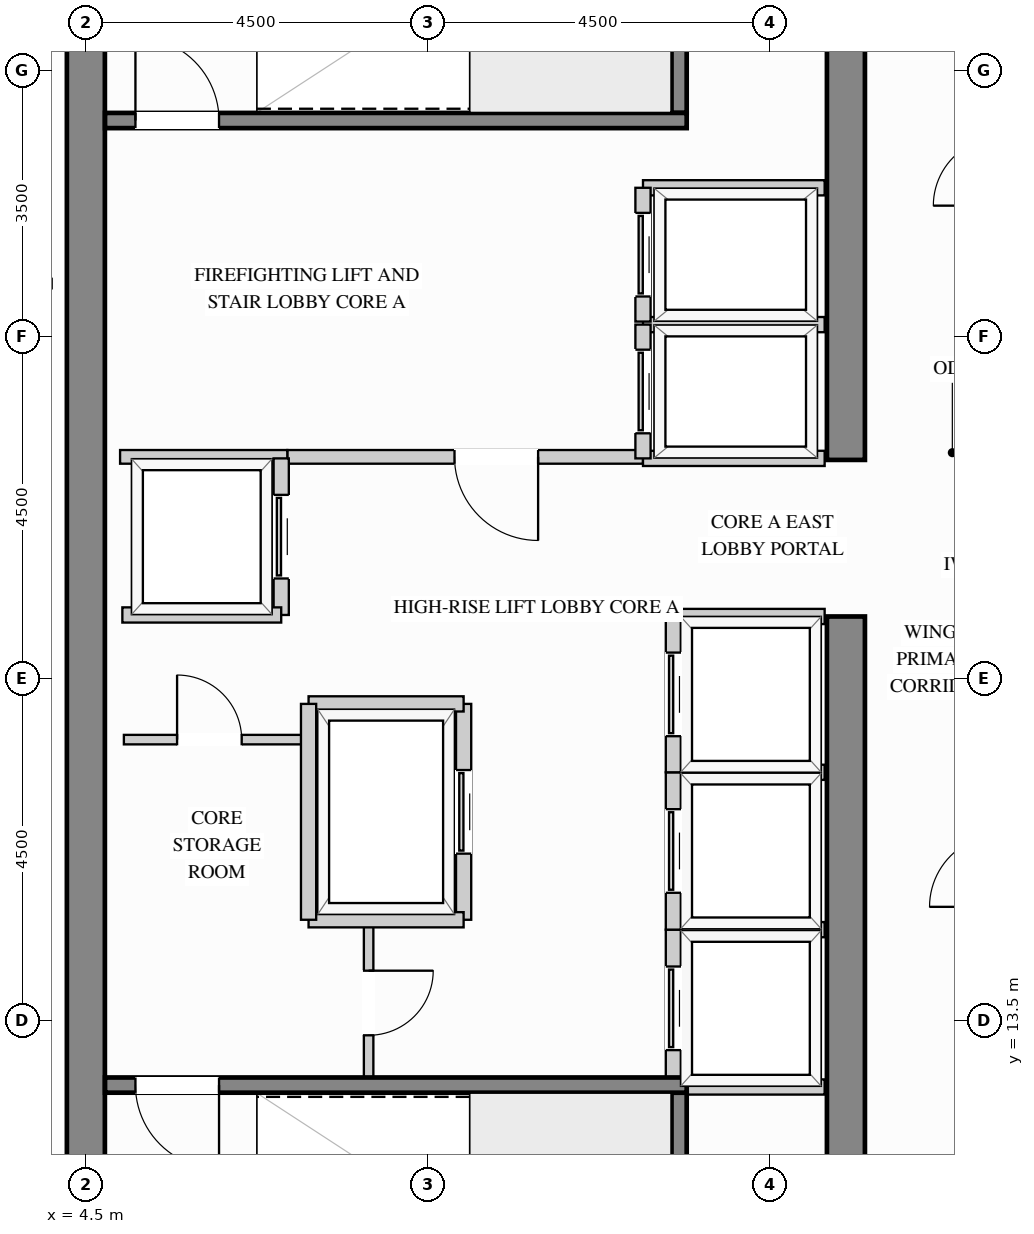
"""IFC4 building model, lengths in metres.
Left out: names, types, materials, properties, quantities, classifications, styles, units other than length and angle.
Written with IfcOpenShell. Run it as: python <this file> out.ifc"""

import sys

from ifc_helpers import new_model, si_unit, direction, frame, frame_2d, origin, place, context, subcontext, project, spatial, rectangle, extrude, source, transform, mapped, element, fill, save


model = new_model("IFC4")
c1 = context("Model", 3, precision=1e-05, world=origin(), true_north=direction((0.0, 1.0)))
c2 = subcontext(c1, "Body", "Model", "MODEL_VIEW")
j1 = project(units=[si_unit("LENGTHUNIT", "METRE"), si_unit("PLANEANGLEUNIT", "RADIAN")], contexts=[c1])
p1 = place(None, origin())
s1 = spatial("IfcSite", under=j1, at=p1, CompositionType="ELEMENT")
p2 = place(p1, origin())
s2 = spatial("IfcBuilding", under=s1, at=p2, CompositionType="ELEMENT")
p3 = place(p2, frame((0.0, 0.0, 248.4)))
s3 = spatial("IfcBuildingStorey", under=s2, at=p3, CompositionType="ELEMENT", Elevation=248.4)
m1 = source(origin(), c2, "Body", "SweptSolid", [
    extrude(rectangle(XDim=10.07, YDim=0.5, at=frame_2d((5.035, 0.0))), origin(), (0.0, 0.0, 1.0), 3.4),
])
p4 = place(p3, frame((14.5, 8.75, 0.0), z_axis=(0.0, 0.0, 1.0), x_axis=(0.0, 1.0, 0.0)))
e1 = element("IfcWall", 1, at=p4, inside=s3, PredefinedType="SHEAR", context=c2, shape_type="MappedRepresentation", body=[
    mapped(m1, transform((0.0, 0.0, 0.0), x_axis=(1.0, 0.0, 0.0), y_axis=(0.0, 1.0, 0.0), z_axis=(0.0, 0.0, 1.0))),
])
m2 = source(origin(), c2, "Body", "SweptSolid", [
    extrude(rectangle(XDim=8.37, YDim=0.5, at=frame_2d((4.185, 0.0))), origin(), (0.0, 0.0, 1.0), 3.4),
])
p5 = place(p3, frame((14.5, 20.88, 0.0), z_axis=(0.0, 0.0, 1.0), x_axis=(0.0, 1.0, 0.0)))
e2 = element("IfcWall", 2, at=p5, inside=s3, PredefinedType="SHEAR", context=c2, shape_type="MappedRepresentation", body=[
    mapped(m2, transform((0.0, 0.0, 0.0), x_axis=(1.0, 0.0, 0.0), y_axis=(0.0, 1.0, 0.0), z_axis=(0.0, 0.0, 1.0))),
])
m3 = source(origin(), c2, "Body", "SweptSolid", [
    extrude(rectangle(XDim=20.5, YDim=0.5, at=frame_2d((10.25, 0.0))), origin(), (0.0, 0.0, 1.0), 3.4),
])
p6 = place(p3, frame((4.5, 8.75, 0.0), z_axis=(0.0, 0.0, 1.0), x_axis=(0.0, 1.0, 0.0)))
e3 = element("IfcWall", 3, at=p6, inside=s3, PredefinedType="SHEAR", context=c2, shape_type="MappedRepresentation", body=[
    mapped(m3, transform((0.0, 0.0, 0.0), x_axis=(1.0, 0.0, 0.0), y_axis=(0.0, 1.0, 0.0), z_axis=(0.0, 0.0, 1.0))),
])
p7 = place(p3, frame((7.15, 20.92, 0.0), z_axis=(0.0, 0.0, 1.0), x_axis=(1.0, 0.0, 0.0)))
e4 = element("IfcWall", 4, at=p7, inside=s3, PredefinedType="PARTITIONING", context=c2, shape_type="SweptSolid", body=[
    extrude(rectangle(XDim=4.68, YDim=0.18, at=frame_2d((2.34, 0.0))), origin(), (0.0, 0.0, 1.0), 3.385),
])
p8 = place(p7, frame((2.2, 0.0, 0.0)))
e5 = element("IfcOpeningElement", 5, at=p8, cuts=e4, PredefinedType="OPENING", context=c2, shape_type="SweptSolid", body=[
    extrude(rectangle(XDim=1.1, YDim=2.15, at=frame_2d((0.55, 1.075))), frame((0.0, 0.1, 0.0), z_axis=(0.0, -1.0, 0.0), x_axis=(1.0, 0.0, 0.0)), (0.0, 0.0, 1.0), 0.2),
])
m4 = source(origin(), c2, "Body", "SweptSolid", [
    extrude(rectangle(XDim=2.2, YDim=0.18, at=frame_2d((1.1, 0.0))), origin(), (0.0, 0.0, 1.0), 3.385),
])
p9 = place(p3, frame((4.95, 20.92, 0.0), z_axis=(0.0, 0.0, 1.0), x_axis=(1.0, 0.0, 0.0)))
e6 = element("IfcWall", 6, at=p9, inside=s3, PredefinedType="PARTITIONING", context=c2, shape_type="MappedRepresentation", body=[
    mapped(m4, transform((0.0, 0.0, 0.0), x_axis=(1.0, 0.0, 0.0), y_axis=(0.0, 1.0, 0.0), z_axis=(0.0, 0.0, 1.0))),
])
p10 = place(p3, frame((8.22, 12.75, 0.0), z_axis=(0.0, 0.0, 1.0), x_axis=(0.0, 1.0, 0.0)))
e7 = element("IfcWall", 7, at=p10, inside=s3, PredefinedType="PARTITIONING", context=c2, shape_type="SweptSolid", body=[
    extrude(rectangle(XDim=2.07, YDim=0.125, at=frame_2d((1.035, 0.0))), origin(), (0.0, 0.0, 1.0), 3.385),
])
p11 = place(p10, frame((0.56, 0.0, 0.0)))
e8 = element("IfcOpeningElement", 8, at=p11, cuts=e7, PredefinedType="OPENING", context=c2, shape_type="SweptSolid", body=[
    extrude(rectangle(XDim=0.85, YDim=2.1, at=frame_2d((0.425, 1.05))), frame((0.0, 0.073, 0.0), z_axis=(0.0, -1.0, 0.0), x_axis=(1.0, 0.0, 0.0)), (0.0, 0.0, 1.0), 0.145),
])
p12 = place(p3, frame((5.0, 17.2, 0.0), z_axis=(0.0, 0.0, 1.0), x_axis=(1.0, 0.0, 0.0)))
e9 = element("IfcWall", 9, at=p12, inside=s3, PredefinedType="PARTITIONING", context=c2, shape_type="SweptSolid", body=[
    extrude(rectangle(XDim=2.4, YDim=0.125, at=frame_2d((1.2, 0.0))), origin(), (0.0, 0.0, 1.0), 3.385),
])
p13 = place(p12, frame((0.7, 0.0, 0.0)))
e10 = element("IfcOpeningElement", 10, at=p13, cuts=e9, PredefinedType="OPENING", context=c2, shape_type="SweptSolid", body=[
    extrude(rectangle(XDim=0.85, YDim=2.1, at=frame_2d((0.425, 1.05))), frame((0.0, 0.073, 0.0), z_axis=(0.0, -1.0, 0.0), x_axis=(1.0, 0.0, 0.0)), (0.0, 0.0, 1.0), 0.145),
])
m5 = source(origin(), c2, "Body", "SweptSolid", [
    extrude(rectangle(XDim=3.698, YDim=0.125, at=frame_2d((1.849, 0.0))), origin(), (0.0, 0.0, 1.0), 3.385),
])
p14 = place(p3, frame((0.352, 23.2, 0.0), z_axis=(0.0, 0.0, 1.0), x_axis=(1.0, 0.0, 0.0)))
e11 = element("IfcWall", 11, at=p14, inside=s3, PredefinedType="PARTITIONING", context=c2, shape_type="MappedRepresentation", body=[
    mapped(m5, transform((0.0, 0.0, 0.0), x_axis=(1.0, 0.0, 0.0), y_axis=(0.0, 1.0, 0.0), z_axis=(0.0, 0.0, 1.0))),
])
m6 = source(origin(), c2, "Body", "SweptSolid", [
    extrude(rectangle(XDim=2.39, YDim=0.2, at=frame_2d((1.195, 0.0))), origin(), (0.0, 0.0, 1.0), 3.385),
])
for number, where, z_axis, x_axis in (
    (12, (11.83, 22.66, 0.0), (0.0, 0.0, 1.0), (1.0, 0.0, 0.0)),
    (13, (11.83, 20.9, 0.0), (0.0, 0.0, 1.0), (1.0, 0.0, 0.0)),
):
    element("IfcWall", number, at=place(p3, frame(where, z_axis=z_axis, x_axis=x_axis)), inside=s3, PredefinedType="PARTITIONING", context=c2, shape_type="MappedRepresentation", body=[
        mapped(m6, transform((0.0, 0.0, 0.0), x_axis=(1.0, 0.0, 0.0), y_axis=(0.0, 1.0, 0.0), z_axis=(0.0, 0.0, 1.0))),
    ])
p15 = place(p3, frame((11.83, 20.9, 0.0), z_axis=(0.0, 0.0, 1.0), x_axis=(0.0, 1.0, 0.0)))
e14 = element("IfcWall", 14, at=p15, inside=s3, PredefinedType="PARTITIONING", context=c2, shape_type="SweptSolid", body=[
    extrude(rectangle(XDim=1.76, YDim=0.2, at=frame_2d((0.88, 0.0))), origin(), (0.0, 0.0, 1.0), 3.385),
])
p16 = place(p15, frame((0.33, 0.0, 0.0)))
e15 = element("IfcOpeningElement", 15, at=p16, cuts=e14, PredefinedType="OPENING", context=c2, shape_type="SweptSolid", body=[
    extrude(rectangle(XDim=1.1, YDim=2.2, at=frame_2d((0.55, 1.1))), frame((0.0, 0.11, 0.0), z_axis=(0.0, -1.0, 0.0), x_axis=(1.0, 0.0, 0.0)), (0.0, 0.0, 1.0), 0.22),
])
p17 = place(p3, frame((11.83, 24.46, 0.0), z_axis=(0.0, 0.0, 1.0), x_axis=(1.0, 0.0, 0.0)))
e16 = element("IfcWall", 16, at=p17, inside=s3, PredefinedType="PARTITIONING", context=c2, shape_type="MappedRepresentation", body=[
    mapped(m6, transform((0.0, 0.0, 0.0), x_axis=(1.0, 0.0, 0.0), y_axis=(0.0, 1.0, 0.0), z_axis=(0.0, 0.0, 1.0))),
])
p18 = place(p3, frame((11.83, 22.7, 0.0), z_axis=(0.0, 0.0, 1.0), x_axis=(0.0, 1.0, 0.0)))
e17 = element("IfcWall", 17, at=p18, inside=s3, PredefinedType="PARTITIONING", context=c2, shape_type="SweptSolid", body=[
    extrude(rectangle(XDim=1.76, YDim=0.2, at=frame_2d((0.88, 0.0))), origin(), (0.0, 0.0, 1.0), 3.385),
])
p19 = place(p18, frame((0.33, 0.0, 0.0)))
e18 = element("IfcOpeningElement", 18, at=p19, cuts=e17, PredefinedType="OPENING", context=c2, shape_type="SweptSolid", body=[
    extrude(rectangle(XDim=1.1, YDim=2.2, at=frame_2d((0.55, 1.1))), frame((0.0, 0.11, 0.0), z_axis=(0.0, -1.0, 0.0), x_axis=(1.0, 0.0, 0.0)), (0.0, 0.0, 1.0), 0.22),
])
m7 = source(origin(), c2, "Body", "SweptSolid", [
    extrude(rectangle(XDim=1.99, YDim=0.2, at=frame_2d((0.995, 0.0))), origin(), (0.0, 0.0, 1.0), 3.385),
])
for number, where, z_axis, x_axis in (
    (19, (12.23, 14.7, 0.0), (0.0, 0.0, 1.0), (1.0, 0.0, 0.0)),
    (20, (12.23, 12.63, 0.0), (0.0, 0.0, 1.0), (1.0, 0.0, 0.0)),
):
    element("IfcWall", number, at=place(p3, frame(where, z_axis=z_axis, x_axis=x_axis)), inside=s3, PredefinedType="PARTITIONING", context=c2, shape_type="MappedRepresentation", body=[
        mapped(m7, transform((0.0, 0.0, 0.0), x_axis=(1.0, 0.0, 0.0), y_axis=(0.0, 1.0, 0.0), z_axis=(0.0, 0.0, 1.0))),
    ])
p20 = place(p3, frame((12.23, 12.63, 0.0), z_axis=(0.0, 0.0, 1.0), x_axis=(0.0, 1.0, 0.0)))
e21 = element("IfcWall", 21, at=p20, inside=s3, PredefinedType="PARTITIONING", context=c2, shape_type="SweptSolid", body=[
    extrude(rectangle(XDim=2.07, YDim=0.2, at=frame_2d((1.035, 0.0))), origin(), (0.0, 0.0, 1.0), 3.385),
])
p21 = place(p20, frame((0.485, 0.0, 0.0)))
e22 = element("IfcOpeningElement", 22, at=p21, cuts=e21, PredefinedType="OPENING", context=c2, shape_type="SweptSolid", body=[
    extrude(rectangle(XDim=1.1, YDim=2.2, at=frame_2d((0.55, 1.1))), frame((0.0, 0.11, 0.0), z_axis=(0.0, -1.0, 0.0), x_axis=(1.0, 0.0, 0.0)), (0.0, 0.0, 1.0), 0.22),
])
p22 = place(p3, frame((12.23, 16.77, 0.0), z_axis=(0.0, 0.0, 1.0), x_axis=(1.0, 0.0, 0.0)))
e23 = element("IfcWall", 23, at=p22, inside=s3, PredefinedType="PARTITIONING", context=c2, shape_type="MappedRepresentation", body=[
    mapped(m7, transform((0.0, 0.0, 0.0), x_axis=(1.0, 0.0, 0.0), y_axis=(0.0, 1.0, 0.0), z_axis=(0.0, 0.0, 1.0))),
])
p23 = place(p3, frame((12.23, 14.7, 0.0), z_axis=(0.0, 0.0, 1.0), x_axis=(0.0, 1.0, 0.0)))
e24 = element("IfcWall", 24, at=p23, inside=s3, PredefinedType="PARTITIONING", context=c2, shape_type="SweptSolid", body=[
    extrude(rectangle(XDim=2.07, YDim=0.2, at=frame_2d((1.035, 0.0))), origin(), (0.0, 0.0, 1.0), 3.385),
])
p24 = place(p23, frame((0.485, 0.0, 0.0)))
e25 = element("IfcOpeningElement", 25, at=p24, cuts=e24, PredefinedType="OPENING", context=c2, shape_type="SweptSolid", body=[
    extrude(rectangle(XDim=1.1, YDim=2.2, at=frame_2d((0.55, 1.1))), frame((0.0, 0.11, 0.0), z_axis=(0.0, -1.0, 0.0), x_axis=(1.0, 0.0, 0.0)), (0.0, 0.0, 1.0), 0.22),
])
p25 = place(p3, frame((12.23, 18.82, 0.0), z_axis=(0.0, 0.0, 1.0), x_axis=(1.0, 0.0, 0.0)))
e26 = element("IfcWall", 26, at=p25, inside=s3, PredefinedType="PARTITIONING", context=c2, shape_type="MappedRepresentation", body=[
    mapped(m7, transform((0.0, 0.0, 0.0), x_axis=(1.0, 0.0, 0.0), y_axis=(0.0, 1.0, 0.0), z_axis=(0.0, 0.0, 1.0))),
])
p26 = place(p3, frame((12.23, 16.77, 0.0), z_axis=(0.0, 0.0, 1.0), x_axis=(0.0, 1.0, 0.0)))
e27 = element("IfcWall", 27, at=p26, inside=s3, PredefinedType="PARTITIONING", context=c2, shape_type="SweptSolid", body=[
    extrude(rectangle(XDim=2.05, YDim=0.2, at=frame_2d((1.025, 0.0))), origin(), (0.0, 0.0, 1.0), 3.385),
])
p27 = place(p26, frame((0.475, 0.0, 0.0)))
e28 = element("IfcOpeningElement", 28, at=p27, cuts=e27, PredefinedType="OPENING", context=c2, shape_type="SweptSolid", body=[
    extrude(rectangle(XDim=1.1, YDim=2.2, at=frame_2d((0.55, 1.1))), frame((0.0, 0.11, 0.0), z_axis=(0.0, -1.0, 0.0), x_axis=(1.0, 0.0, 0.0)), (0.0, 0.0, 1.0), 0.22),
])
p28 = place(p3, frame((7.07, 18.84, 0.0), z_axis=(0.0, 0.0, 1.0), x_axis=(0.0, 1.0, 0.0)))
e29 = element("IfcWall", 29, at=p28, inside=s3, PredefinedType="PARTITIONING", context=c2, shape_type="SweptSolid", body=[
    extrude(rectangle(XDim=2.06, YDim=0.2, at=frame_2d((1.03, 0.0))), origin(), (0.0, 0.0, 1.0), 3.385),
])
p29 = place(p28, frame((0.48, 0.0, 0.0)))
e30 = element("IfcOpeningElement", 30, at=p29, cuts=e29, PredefinedType="OPENING", context=c2, shape_type="SweptSolid", body=[
    extrude(rectangle(XDim=1.1, YDim=2.2, at=frame_2d((0.55, 1.1))), frame((0.0, 0.11, 0.0), z_axis=(0.0, -1.0, 0.0), x_axis=(1.0, 0.0, 0.0)), (0.0, 0.0, 1.0), 0.22),
])
m8 = source(origin(), c2, "Body", "SweptSolid", [
    extrude(rectangle(XDim=2.09, YDim=0.2, at=frame_2d((1.045, 0.0))), origin(), (0.0, 0.0, 1.0), 3.385),
])
p30 = place(p3, frame((4.98, 18.84, 0.0), z_axis=(0.0, 0.0, 1.0), x_axis=(1.0, 0.0, 0.0)))
e31 = element("IfcWall", 31, at=p30, inside=s3, PredefinedType="PARTITIONING", context=c2, shape_type="MappedRepresentation", body=[
    mapped(m8, transform((0.0, 0.0, 0.0), x_axis=(1.0, 0.0, 0.0), y_axis=(0.0, 1.0, 0.0), z_axis=(0.0, 0.0, 1.0))),
])
p31 = place(p3, frame((9.47, 14.83, 0.0), z_axis=(0.0, 0.0, 1.0), x_axis=(0.0, 1.0, 0.0)))
e32 = element("IfcWall", 32, at=p31, inside=s3, PredefinedType="PARTITIONING", context=c2, shape_type="SweptSolid", body=[
    extrude(rectangle(XDim=2.84, YDim=0.2, at=frame_2d((1.42, 0.0))), origin(), (0.0, 0.0, 1.0), 3.385),
])
p32 = place(p31, frame((0.87, 0.0, 0.0)))
e33 = element("IfcOpeningElement", 33, at=p32, cuts=e32, PredefinedType="OPENING", context=c2, shape_type="SweptSolid", body=[
    extrude(rectangle(XDim=1.1, YDim=2.2, at=frame_2d((0.55, 1.1))), frame((0.0, 0.11, 0.0), z_axis=(0.0, -1.0, 0.0), x_axis=(1.0, 0.0, 0.0)), (0.0, 0.0, 1.0), 0.22),
])
m9 = source(origin(), c2, "Body", "SweptSolid", [
    extrude(rectangle(XDim=2.04, YDim=0.2, at=frame_2d((1.02, 0.0))), origin(), (0.0, 0.0, 1.0), 3.385),
])
for number, where, z_axis, x_axis in (
    (34, (7.43, 17.67, 0.0), (0.0, 0.0, 1.0), (1.0, 0.0, 0.0)),
    (35, (7.43, 14.83, 0.0), (0.0, 0.0, 1.0), (1.0, 0.0, 0.0)),
):
    element("IfcWall", number, at=place(p3, frame(where, z_axis=z_axis, x_axis=x_axis)), inside=s3, PredefinedType="PARTITIONING", context=c2, shape_type="MappedRepresentation", body=[
        mapped(m9, transform((0.0, 0.0, 0.0), x_axis=(1.0, 0.0, 0.0), y_axis=(0.0, 1.0, 0.0), z_axis=(0.0, 0.0, 1.0))),
    ])
m10 = source(origin(), c2, "Body", "SweptSolid", [
    extrude(rectangle(XDim=2.84, YDim=0.2, at=frame_2d((1.42, 0.0))), origin(), (0.0, 0.0, 1.0), 3.385),
])
p33 = place(p3, frame((7.43, 14.83, 0.0), z_axis=(0.0, 0.0, 1.0), x_axis=(0.0, 1.0, 0.0)))
e36 = element("IfcWall", 36, at=p33, inside=s3, PredefinedType="PARTITIONING", context=c2, shape_type="MappedRepresentation", body=[
    mapped(m10, transform((0.0, 0.0, 0.0), x_axis=(1.0, 0.0, 0.0), y_axis=(0.0, 1.0, 0.0), z_axis=(0.0, 0.0, 1.0))),
])
m11 = source(origin(), c2, "Body", "SweptSolid", [
    extrude(rectangle(XDim=3.803, YDim=0.2, at=frame_2d((1.901, 0.0))), origin(), (0.0, 0.0, 1.0), 3.4),
])
p34 = place(p3, frame((12.305, 8.752, 0.0), z_axis=(0.0, 0.0, 1.0), x_axis=(0.0, 1.0, 0.0)))
e37 = element("IfcWall", 37, at=p34, inside=s3, PredefinedType="SHEAR", context=c2, shape_type="MappedRepresentation", body=[
    mapped(m11, transform((0.0, 0.0, 0.0), x_axis=(1.0, 0.0, 0.0), y_axis=(0.0, 1.0, 0.0), z_axis=(0.0, 0.0, 1.0))),
])
p35 = place(p3, frame((4.752, 12.655, 0.0), z_axis=(0.0, 0.0, 1.0), x_axis=(1.0, 0.0, 0.0)))
e38 = element("IfcWall", 38, at=p35, inside=s3, PredefinedType="SHEAR", context=c2, shape_type="SweptSolid", body=[
    extrude(rectangle(XDim=7.653, YDim=0.2, at=frame_2d((3.827, 0.0))), origin(), (0.0, 0.0, 1.0), 3.4),
])
p36 = place(p35, frame((0.4, 0.0, 0.0)))
e39 = element("IfcOpeningElement", 39, at=p36, cuts=e38, PredefinedType="OPENING", context=c2, shape_type="SweptSolid", body=[
    extrude(rectangle(XDim=1.1, YDim=2.15, at=frame_2d((0.55, 1.075))), frame((0.0, 0.11, 0.0), z_axis=(0.0, -1.0, 0.0), x_axis=(1.0, 0.0, 0.0)), (0.0, 0.0, 1.0), 0.22),
])
p37 = place(p3, frame((12.305, 25.445, 0.0), z_axis=(0.0, 0.0, 1.0), x_axis=(0.0, 1.0, 0.0)))
e40 = element("IfcWall", 40, at=p37, inside=s3, PredefinedType="SHEAR", context=c2, shape_type="MappedRepresentation", body=[
    mapped(m11, transform((0.0, 0.0, 0.0), x_axis=(1.0, 0.0, 0.0), y_axis=(0.0, 1.0, 0.0), z_axis=(0.0, 0.0, 1.0))),
])
p38 = place(p3, frame((4.752, 25.345, 0.0), z_axis=(0.0, 0.0, 1.0), x_axis=(1.0, 0.0, 0.0)))
e41 = element("IfcWall", 41, at=p38, inside=s3, PredefinedType="SHEAR", context=c2, shape_type="SweptSolid", body=[
    extrude(rectangle(XDim=7.653, YDim=0.2, at=frame_2d((3.827, 0.0))), origin(), (0.0, 0.0, 1.0), 3.4),
])
p39 = place(p38, frame((0.4, 0.0, 0.0)))
e42 = element("IfcOpeningElement", 42, at=p39, cuts=e41, PredefinedType="OPENING", context=c2, shape_type="SweptSolid", body=[
    extrude(rectangle(XDim=1.1, YDim=2.15, at=frame_2d((0.55, 1.075))), frame((0.0, 0.11, 0.0), z_axis=(0.0, -1.0, 0.0), x_axis=(1.0, 0.0, 0.0)), (0.0, 0.0, 1.0), 0.22),
])
m12 = source(origin(), c2, "Body", "SweptSolid", [
    extrude(rectangle(XDim=1.1, YDim=2.15, at=frame_2d((0.55, 1.075))), frame((0.0, 0.025, 0.0), z_axis=(0.0, -1.0, 0.0), x_axis=(1.0, 0.0, 0.0)), (0.0, 0.0, 1.0), 0.05),
])
p40 = place(p8, origin())
e43 = element("IfcDoor", 43, at=p40, inside=s3, OperationType="SINGLE_SWING_RIGHT", PredefinedType="DOOR", context=c2, shape_type="MappedRepresentation", body=[
    mapped(m12, transform((0.0, 0.0, 0.0), x_axis=(1.0, 0.0, 0.0), y_axis=(0.0, 1.0, 0.0), z_axis=(0.0, 0.0, 1.0))),
])
fill(e5, e43)
m13 = source(origin(), c2, "Body", "SweptSolid", [
    extrude(rectangle(XDim=1.1, YDim=2.2, at=frame_2d((0.55, 1.1))), frame((0.0, 0.025, 0.0), z_axis=(0.0, -1.0, 0.0), x_axis=(1.0, 0.0, 0.0)), (0.0, 0.0, 1.0), 0.05),
])
p41 = place(p16, origin())
e44 = element("IfcDoor", 44, at=p41, inside=s3, OperationType="SLIDING_TO_LEFT", PredefinedType="DOOR", context=c2, shape_type="MappedRepresentation", body=[
    mapped(m13, transform((0.0, 0.0, 0.0), x_axis=(1.0, 0.0, 0.0), y_axis=(0.0, 1.0, 0.0), z_axis=(0.0, 0.0, 1.0))),
])
fill(e15, e44)
p42 = place(p19, origin())
e45 = element("IfcDoor", 45, at=p42, inside=s3, OperationType="SLIDING_TO_LEFT", PredefinedType="DOOR", context=c2, shape_type="MappedRepresentation", body=[
    mapped(m13, transform((0.0, 0.0, 0.0), x_axis=(1.0, 0.0, 0.0), y_axis=(0.0, 1.0, 0.0), z_axis=(0.0, 0.0, 1.0))),
])
fill(e18, e45)
p43 = place(p21, origin())
e46 = element("IfcDoor", 46, at=p43, inside=s3, OperationType="SLIDING_TO_LEFT", PredefinedType="DOOR", context=c2, shape_type="MappedRepresentation", body=[
    mapped(m13, transform((0.0, 0.0, 0.0), x_axis=(1.0, 0.0, 0.0), y_axis=(0.0, 1.0, 0.0), z_axis=(0.0, 0.0, 1.0))),
])
fill(e22, e46)
p44 = place(p24, origin())
e47 = element("IfcDoor", 47, at=p44, inside=s3, OperationType="SLIDING_TO_LEFT", PredefinedType="DOOR", context=c2, shape_type="MappedRepresentation", body=[
    mapped(m13, transform((0.0, 0.0, 0.0), x_axis=(1.0, 0.0, 0.0), y_axis=(0.0, 1.0, 0.0), z_axis=(0.0, 0.0, 1.0))),
])
fill(e25, e47)
p45 = place(p27, origin())
e48 = element("IfcDoor", 48, at=p45, inside=s3, OperationType="SLIDING_TO_LEFT", PredefinedType="DOOR", context=c2, shape_type="MappedRepresentation", body=[
    mapped(m13, transform((0.0, 0.0, 0.0), x_axis=(1.0, 0.0, 0.0), y_axis=(0.0, 1.0, 0.0), z_axis=(0.0, 0.0, 1.0))),
])
fill(e28, e48)
p46 = place(p29, origin())
e49 = element("IfcDoor", 49, at=p46, inside=s3, OperationType="SLIDING_TO_LEFT", PredefinedType="DOOR", context=c2, shape_type="MappedRepresentation", body=[
    mapped(m13, transform((0.0, 0.0, 0.0), x_axis=(1.0, 0.0, 0.0), y_axis=(0.0, 1.0, 0.0), z_axis=(0.0, 0.0, 1.0))),
])
fill(e30, e49)
p47 = place(p32, origin())
e50 = element("IfcDoor", 50, at=p47, inside=s3, OperationType="SLIDING_TO_LEFT", PredefinedType="DOOR", context=c2, shape_type="MappedRepresentation", body=[
    mapped(m13, transform((0.0, 0.0, 0.0), x_axis=(1.0, 0.0, 0.0), y_axis=(0.0, 1.0, 0.0), z_axis=(0.0, 0.0, 1.0))),
])
fill(e33, e50)
m14 = source(origin(), c2, "Body", "SweptSolid", [
    extrude(rectangle(XDim=0.85, YDim=2.1, at=frame_2d((0.425, 1.05))), frame((0.0, 0.025, 0.0), z_axis=(0.0, -1.0, 0.0), x_axis=(1.0, 0.0, 0.0)), (0.0, 0.0, 1.0), 0.05),
])
p48 = place(p13, origin())
e51 = element("IfcDoor", 51, at=p48, inside=s3, OperationType="SINGLE_SWING_LEFT", PredefinedType="DOOR", context=c2, shape_type="MappedRepresentation", body=[
    mapped(m14, transform((0.0, 0.0, 0.0), x_axis=(1.0, 0.0, 0.0), y_axis=(0.0, 1.0, 0.0), z_axis=(0.0, 0.0, 1.0))),
])
fill(e10, e51)
p49 = place(p11, origin())
e52 = element("IfcDoor", 52, at=p49, inside=s3, OperationType="SINGLE_SWING_RIGHT", PredefinedType="DOOR", context=c2, shape_type="MappedRepresentation", body=[
    mapped(m14, transform((0.0, 0.0, 0.0), x_axis=(1.0, 0.0, 0.0), y_axis=(0.0, 1.0, 0.0), z_axis=(0.0, 0.0, 1.0))),
])
fill(e8, e52)
m15 = source(origin(), c2, "Body", "SweptSolid", [
    extrude(rectangle(XDim=1.1, YDim=2.15, at=frame_2d((0.55, 1.075))), frame((0.0, 0.025, 0.0), z_axis=(0.0, -1.0, 0.0), x_axis=(1.0, 0.0, 0.0)), (0.0, 0.0, 1.0), 0.05),
])
p50 = place(p36, origin())
e53 = element("IfcDoor", 53, at=p50, inside=s3, OperationType="SINGLE_SWING_RIGHT", PredefinedType="DOOR", context=c2, shape_type="MappedRepresentation", body=[
    mapped(m15, transform((0.0, 0.0, 0.0), x_axis=(1.0, 0.0, 0.0), y_axis=(0.0, 1.0, 0.0), z_axis=(0.0, 0.0, 1.0))),
])
fill(e39, e53)
p51 = place(p39, origin())
e54 = element("IfcDoor", 54, at=p51, inside=s3, OperationType="SINGLE_SWING_LEFT", PredefinedType="DOOR", context=c2, shape_type="MappedRepresentation", body=[
    mapped(m15, transform((0.0, 0.0, 0.0), x_axis=(1.0, 0.0, 0.0), y_axis=(0.0, 1.0, 0.0), z_axis=(0.0, 0.0, 1.0))),
])
fill(e42, e54)
save(model, sys.argv[1])
